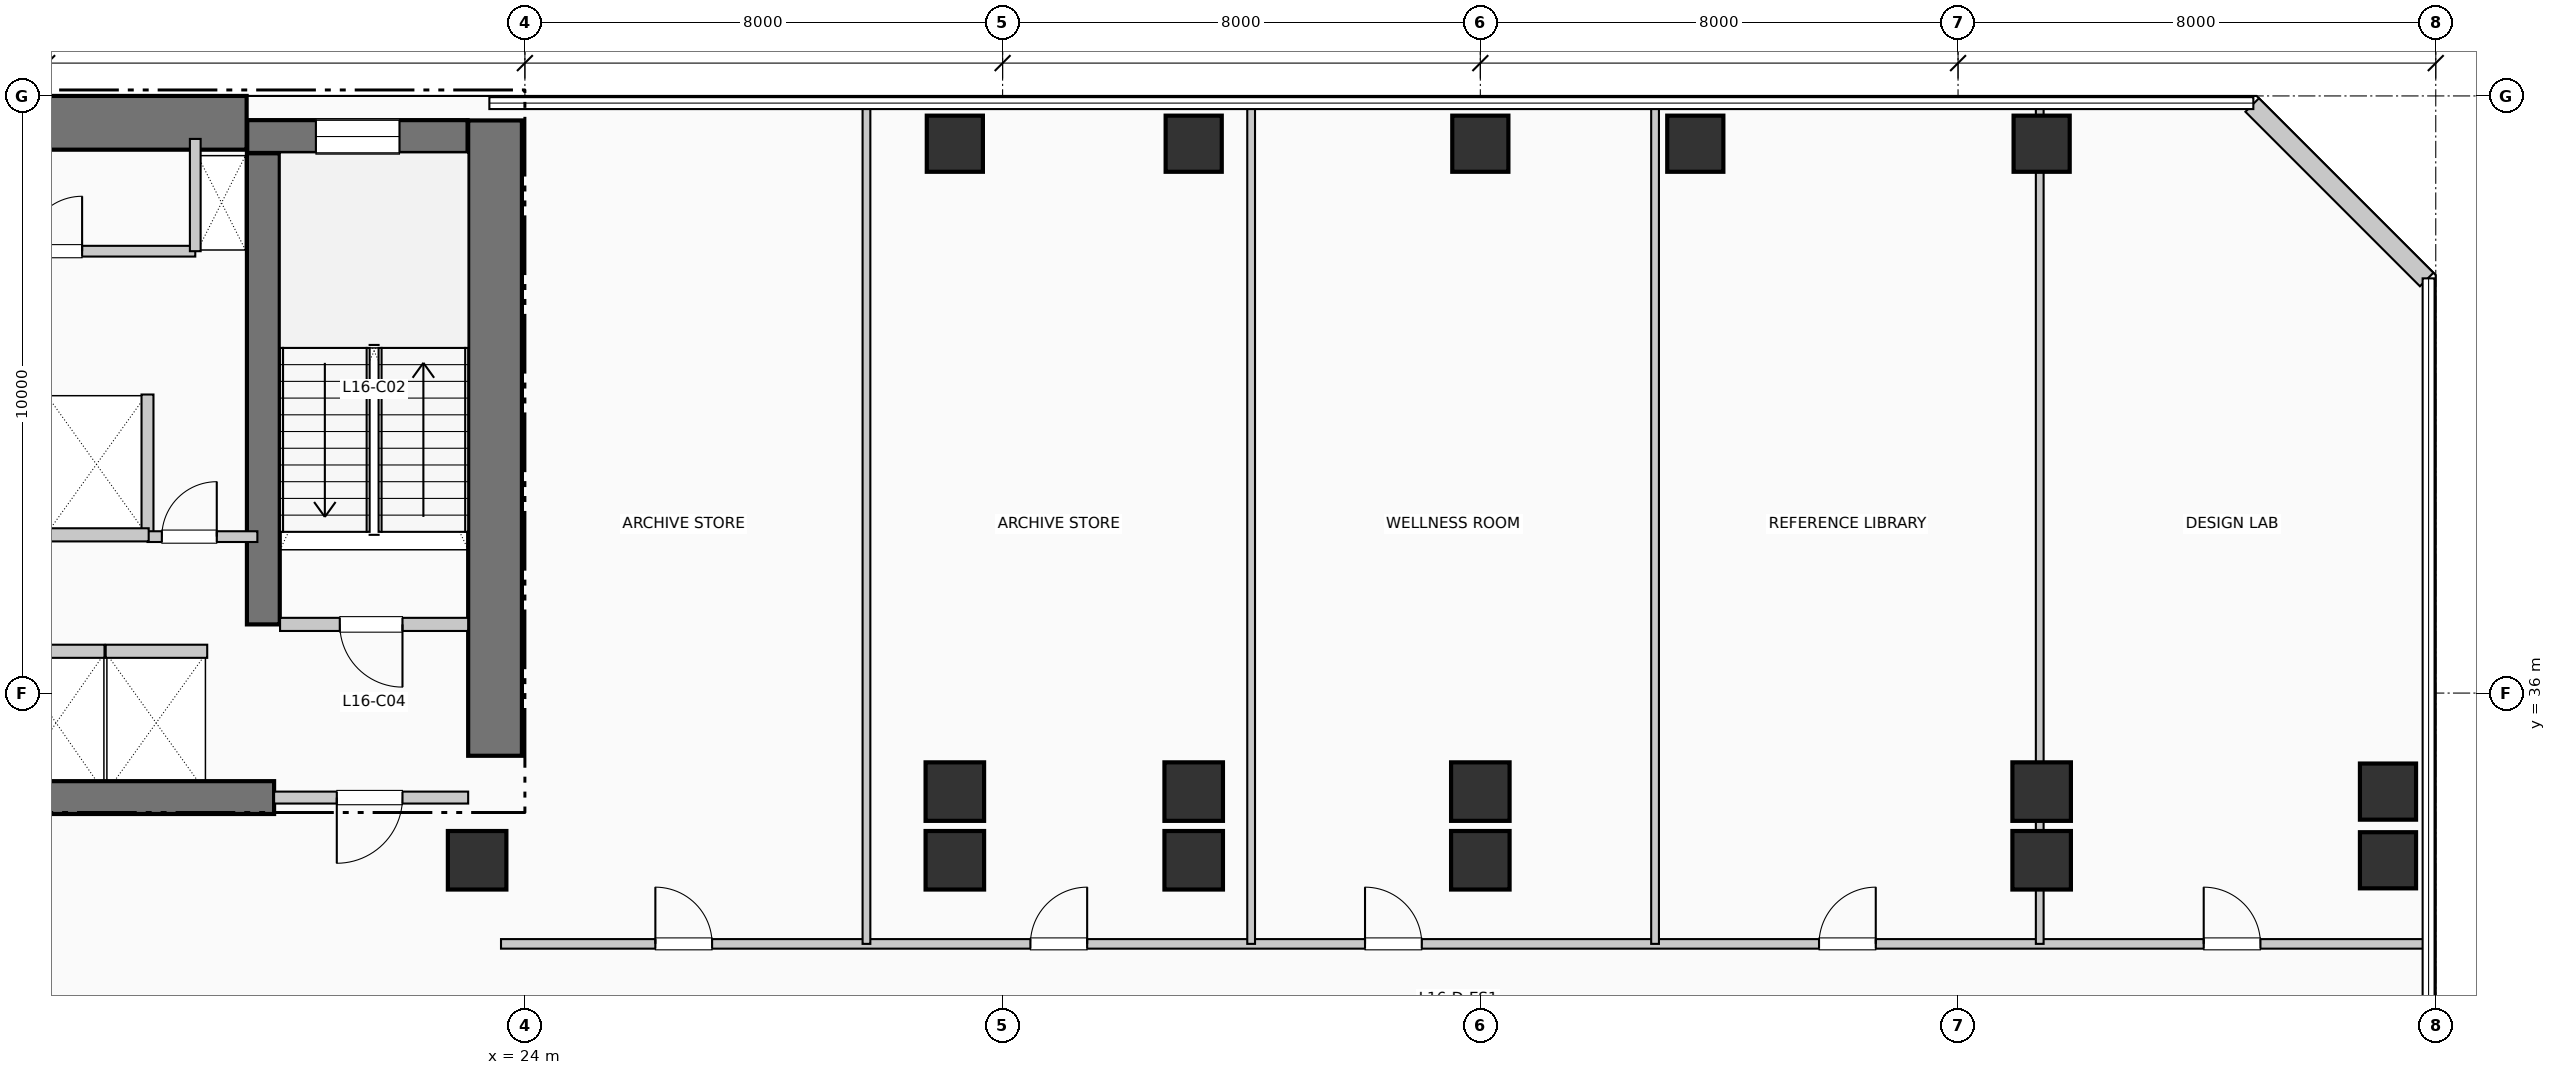
"""IFC4 building model, lengths in metres.
Left out: names, types, materials, properties, quantities, classifications, styles, units other than length and angle.
Written with IfcOpenShell. Run it as: python <this file> out.ifc"""

import sys

from ifc_helpers import new_model, si_unit, direction, frame, frame_2d, origin, origin_2d, place, context, subcontext, project, spatial, rectangle, extrude, element, fill, save


model = new_model("IFC4")
c1 = context("Model", 3, precision=1e-05, world=origin(), true_north=direction((0.0, 1.0)))
c2 = subcontext(c1, "Body", "Model", "MODEL_VIEW")
j1 = project(units=[si_unit("LENGTHUNIT", "METRE"), si_unit("PLANEANGLEUNIT", "RADIAN")], contexts=[c1])
p1 = place(None, origin())
s1 = spatial("IfcSite", under=j1, at=p1, CompositionType="ELEMENT")
p2 = place(p1, origin())
s2 = spatial("IfcBuilding", under=s1, at=p2, CompositionType="ELEMENT")
p3 = place(p2, frame((0.0, 0.0, 69.96)))
s3 = spatial("IfcBuildingStorey", under=s2, at=p3, CompositionType="ELEMENT", Elevation=69.96)
p4 = place(p3, frame((5.36, 45.55, 0.0), z_axis=(0.0, 0.0, 1.0), x_axis=(1.0, 0.0, 0.0)))
e1 = element("IfcWall", 1, at=p4, inside=s3, PredefinedType="SHEAR", context=c2, shape_type="SweptSolid", body=[
    extrude(rectangle(XDim=13.98, YDim=0.9, at=frame_2d((6.99, 0.0))), origin(), (0.0, 0.0, 1.0), 3.96),
])
p5 = place(p3, frame((23.5, 34.95, 0.0), z_axis=(0.0, 0.0, 1.0), x_axis=(0.0, 1.0, 0.0)))
e2 = element("IfcWall", 2, at=p5, inside=s3, PredefinedType="SHEAR", context=c2, shape_type="SweptSolid", body=[
    extrude(rectangle(XDim=10.64, YDim=0.9, at=frame_2d((5.32, 0.0))), origin(), (0.0, 0.0, 1.0), 3.96),
])
p6 = place(p3, frame((13.68, 34.25, 0.0), z_axis=(0.0, 0.0, 1.0), x_axis=(1.0, 0.0, 0.0)))
e3 = element("IfcWall", 3, at=p6, inside=s3, PredefinedType="SHEAR", context=c2, shape_type="SweptSolid", body=[
    extrude(rectangle(XDim=6.12, YDim=0.55, at=frame_2d((3.06, 0.0))), origin(), (0.0, 0.0, 1.0), 3.96),
])
p7 = place(p3, frame((19.62, 37.15, 0.0), z_axis=(0.0, 0.0, 1.0), x_axis=(0.0, 1.0, 0.0)))
e4 = element("IfcWall", 4, at=p7, inside=s3, PredefinedType="SHEAR", context=c2, shape_type="SweptSolid", body=[
    extrude(rectangle(XDim=7.89, YDim=0.55, at=frame_2d((3.945, 0.0))), origin(), (0.0, 0.0, 1.0), 3.96),
])
p8 = place(p3, frame((19.35, 45.32, 0.0), z_axis=(0.0, 0.0, 1.0), x_axis=(1.0, 0.0, 0.0)))
e5 = element("IfcWall", 5, at=p8, inside=s3, PredefinedType="SHEAR", context=c2, shape_type="SweptSolid", body=[
    extrude(rectangle(XDim=3.69, YDim=0.55, at=frame_2d((1.845, 0.0))), origin(), (0.0, 0.0, 1.0), 3.96),
])
p9 = place(p8, frame((1.15, 0.0, 1.05)))
e6 = element("IfcOpeningElement", 6, at=p9, cuts=e5, PredefinedType="OPENING", context=c2, shape_type="SweptSolid", body=[
    extrude(rectangle(XDim=1.4, YDim=1.8, at=frame_2d((0.7, 0.9))), frame((0.0, 0.285, 0.0), z_axis=(0.0, -1.0, 0.0), x_axis=(1.0, 0.0, 0.0)), (0.0, 0.0, 1.0), 0.57),
])
for number, where, z_axis, x_axis in (
    (7, (23.2, 33.2, 0.0), (0.0, 0.0, 1.0), (1.0, 0.0, 0.0)),
    (8, (31.2, 33.2, 0.0), (0.0, 0.0, 1.0), (1.0, 0.0, 0.0)),
    (9, (31.2, 34.35, 0.0), (0.0, 0.0, 1.0), (1.0, 0.0, 0.0)),
):
    element("IfcColumn", number, at=place(p3, frame(where, z_axis=z_axis, x_axis=x_axis)), inside=s3, PredefinedType="COLUMN", context=c2, shape_type="SweptSolid", body=[
        extrude(rectangle(XDim=0.98, YDim=0.98, at=origin_2d()), origin(), (0.0, 0.0, 1.0), 3.96),
    ])
p10 = place(p3, frame((31.2, 45.2, 0.0), z_axis=(0.0, 0.0, 1.0), x_axis=(1.0, 0.0, 0.0)))
e10 = element("IfcColumn", 10, at=p10, inside=s3, PredefinedType="COLUMN", context=c2, shape_type="SweptSolid", body=[
    extrude(rectangle(XDim=0.94, YDim=0.94, at=origin_2d()), origin(), (0.0, 0.0, 1.0), 3.96),
])
for number, where, z_axis, x_axis in (
    (11, (35.2, 33.2, 0.0), (0.0, 0.0, 1.0), (1.0, 0.0, 0.0)),
    (12, (35.2, 34.35, 0.0), (0.0, 0.0, 1.0), (1.0, 0.0, 0.0)),
):
    element("IfcColumn", number, at=place(p3, frame(where, z_axis=z_axis, x_axis=x_axis)), inside=s3, PredefinedType="COLUMN", context=c2, shape_type="SweptSolid", body=[
        extrude(rectangle(XDim=0.98, YDim=0.98, at=origin_2d()), origin(), (0.0, 0.0, 1.0), 3.96),
    ])
p11 = place(p3, frame((35.2, 45.2, 0.0), z_axis=(0.0, 0.0, 1.0), x_axis=(1.0, 0.0, 0.0)))
e13 = element("IfcColumn", 13, at=p11, inside=s3, PredefinedType="COLUMN", context=c2, shape_type="SweptSolid", body=[
    extrude(rectangle(XDim=0.94, YDim=0.94, at=origin_2d()), origin(), (0.0, 0.0, 1.0), 3.96),
])
for number, where, z_axis, x_axis in (
    (14, (40.0, 33.2, 0.0), (0.0, 0.0, 1.0), (1.0, 0.0, 0.0)),
    (15, (40.0, 34.35, 0.0), (0.0, 0.0, 1.0), (1.0, 0.0, 0.0)),
):
    element("IfcColumn", number, at=place(p3, frame(where, z_axis=z_axis, x_axis=x_axis)), inside=s3, PredefinedType="COLUMN", context=c2, shape_type="SweptSolid", body=[
        extrude(rectangle(XDim=0.98, YDim=0.98, at=origin_2d()), origin(), (0.0, 0.0, 1.0), 3.96),
    ])
for number, where, z_axis, x_axis in (
    (16, (40.0, 45.2, 0.0), (0.0, 0.0, 1.0), (1.0, 0.0, 0.0)),
    (17, (43.6, 45.2, 0.0), (0.0, 0.0, 1.0), (1.0, 0.0, 0.0)),
):
    element("IfcColumn", number, at=place(p3, frame(where, z_axis=z_axis, x_axis=x_axis)), inside=s3, PredefinedType="COLUMN", context=c2, shape_type="SweptSolid", body=[
        extrude(rectangle(XDim=0.94, YDim=0.94, at=origin_2d()), origin(), (0.0, 0.0, 1.0), 3.96),
    ])
for number, where, z_axis, x_axis in (
    (18, (49.4, 33.2, 0.0), (0.0, 0.0, 1.0), (1.0, 0.0, 0.0)),
    (19, (49.4, 34.35, 0.0), (0.0, 0.0, 1.0), (1.0, 0.0, 0.0)),
):
    element("IfcColumn", number, at=place(p3, frame(where, z_axis=z_axis, x_axis=x_axis)), inside=s3, PredefinedType="COLUMN", context=c2, shape_type="SweptSolid", body=[
        extrude(rectangle(XDim=0.98, YDim=0.98, at=origin_2d()), origin(), (0.0, 0.0, 1.0), 3.96),
    ])
for number, where, z_axis, x_axis in (
    (20, (49.4, 45.2, 0.0), (0.0, 0.0, 1.0), (1.0, 0.0, 0.0)),
    (21, (55.2, 33.2, 0.0), (0.0, 0.0, 1.0), (1.0, 0.0, 0.0)),
    (22, (55.2, 34.35, 0.0), (0.0, 0.0, 1.0), (1.0, 0.0, 0.0)),
):
    element("IfcColumn", number, at=place(p3, frame(where, z_axis=z_axis, x_axis=x_axis)), inside=s3, PredefinedType="COLUMN", context=c2, shape_type="SweptSolid", body=[
        extrude(rectangle(XDim=0.94, YDim=0.94, at=origin_2d()), origin(), (0.0, 0.0, 1.0), 3.96),
    ])
p12 = place(p3, frame((55.848, 42.926, 0.0), z_axis=(0.0, 0.0, 1.0), x_axis=(-0.707106781187, 0.707106781187, 0.0)))
e23 = element("IfcWall", 23, at=p12, inside=s3, PredefinedType="SOLIDWALL", context=c2, shape_type="SweptSolid", body=[
    extrude(rectangle(XDim=4.133, YDim=0.32, at=frame_2d((2.066, 0.0))), origin(), (0.0, 0.0, 1.0), 3.71),
])
p13 = place(p3, frame((19.9, 37.15, 0.0), z_axis=(0.0, 0.0, 1.0), x_axis=(1.0, 0.0, 0.0)))
e24 = element("IfcWall", 24, at=p13, inside=s3, PredefinedType="PARTITIONING", context=c2, shape_type="SweptSolid", body=[
    extrude(rectangle(XDim=3.15, YDim=0.22, at=frame_2d((1.575, 0.0))), origin(), (0.0, 0.0, 1.0), 3.71),
])
p14 = place(p13, frame((2.05, 0.0, 0.0), z_axis=(0.0, 0.0, 1.0), x_axis=(-1.0, 0.0, 0.0)))
e25 = element("IfcOpeningElement", 25, at=p14, cuts=e24, PredefinedType="OPENING", context=c2, shape_type="SweptSolid", body=[
    extrude(rectangle(XDim=1.05, YDim=2.15, at=frame_2d((0.525, 1.075))), frame((0.0, 0.12, 0.0), z_axis=(0.0, -1.0, 0.0), x_axis=(1.0, 0.0, 0.0)), (0.0, 0.0, 1.0), 0.24),
])
p15 = place(p3, frame((19.8, 34.25, 0.0), z_axis=(0.0, 0.0, 1.0), x_axis=(1.0, 0.0, 0.0)))
e26 = element("IfcWall", 26, at=p15, inside=s3, PredefinedType="PARTITIONING", context=c2, shape_type="SweptSolid", body=[
    extrude(rectangle(XDim=3.25, YDim=0.2, at=frame_2d((1.625, 0.0))), origin(), (0.0, 0.0, 1.0), 3.71),
])
p16 = place(p15, frame((2.15, 0.0, 0.0), z_axis=(0.0, 0.0, 1.0), x_axis=(-1.0, 0.0, 0.0)))
e27 = element("IfcOpeningElement", 27, at=p16, cuts=e26, PredefinedType="OPENING", context=c2, shape_type="SweptSolid", body=[
    extrude(rectangle(XDim=1.1, YDim=2.15, at=frame_2d((0.55, 1.075))), frame((0.0, 0.11, 0.0), z_axis=(0.0, -1.0, 0.0), x_axis=(1.0, 0.0, 0.0)), (0.0, 0.0, 1.0), 0.22),
])
p17 = place(p3, frame((17.68, 38.65, 0.0), z_axis=(0.0, 0.0, 1.0), x_axis=(0.0, 1.0, 0.0)))
e28 = element("IfcWall", 28, at=p17, inside=s3, PredefinedType="PARTITIONING", context=c2, shape_type="SweptSolid", body=[
    extrude(rectangle(XDim=2.35, YDim=0.2, at=frame_2d((1.175, 0.0))), origin(), (0.0, 0.0, 1.0), 3.71),
])
p18 = place(p3, frame((17.68, 38.62, 0.0), z_axis=(0.0, 0.0, 1.0), x_axis=(1.0, 0.0, 0.0)))
e29 = element("IfcWall", 29, at=p18, inside=s3, PredefinedType="PARTITIONING", context=c2, shape_type="SweptSolid", body=[
    extrude(rectangle(XDim=1.84, YDim=0.18, at=frame_2d((0.92, 0.0))), origin(), (0.0, 0.0, 1.0), 3.71),
])
p19 = place(p18, frame((0.24, 0.0, 0.0)))
e30 = element("IfcOpeningElement", 30, at=p19, cuts=e29, PredefinedType="OPENING", context=c2, shape_type="SweptSolid", body=[
    extrude(rectangle(XDim=0.92, YDim=2.1, at=frame_2d((0.46, 1.05))), frame((0.0, 0.1, 0.0), z_axis=(0.0, -1.0, 0.0), x_axis=(1.0, 0.0, 0.0)), (0.0, 0.0, 1.0), 0.2),
])
p20 = place(p3, frame((13.68, 36.7, 0.0), z_axis=(0.0, 0.0, 1.0), x_axis=(1.0, 0.0, 0.0)))
e31 = element("IfcWall", 31, at=p20, inside=s3, PredefinedType="PARTITIONING", context=c2, shape_type="SweptSolid", body=[
    extrude(rectangle(XDim=3.28, YDim=0.22, at=frame_2d((1.64, 0.0))), origin(), (0.0, 0.0, 1.0), 3.71),
])
p21 = place(p3, frame((16.98, 36.7, 0.0), z_axis=(0.0, 0.0, 1.0), x_axis=(1.0, 0.0, 0.0)))
e32 = element("IfcWall", 32, at=p21, inside=s3, PredefinedType="PARTITIONING", context=c2, shape_type="SweptSolid", body=[
    extrude(rectangle(XDim=1.7, YDim=0.22, at=frame_2d((0.85, 0.0))), origin(), (0.0, 0.0, 1.0), 3.71),
])
p22 = place(p3, frame((15.98, 38.65, 0.0), z_axis=(0.0, 0.0, 1.0), x_axis=(1.0, 0.0, 0.0)))
e33 = element("IfcWall", 33, at=p22, inside=s3, PredefinedType="PARTITIONING", context=c2, shape_type="SweptSolid", body=[
    extrude(rectangle(XDim=1.72, YDim=0.22, at=frame_2d((0.86, 0.0))), origin(), (0.0, 0.0, 1.0), 3.71),
])
p23 = place(p3, frame((9.15, 43.4, 0.0), z_axis=(0.0, 0.0, 1.0), x_axis=(1.0, 0.0, 0.0)))
e34 = element("IfcWall", 34, at=p23, inside=s3, PredefinedType="PLUMBINGWALL", context=c2, shape_type="SweptSolid", body=[
    extrude(rectangle(XDim=9.33, YDim=0.18, at=frame_2d((4.665, 0.0))), origin(), (0.0, 0.0, 1.0), 3.71),
])
p24 = place(p23, frame((1.88, 0.0, 0.0)))
e35 = element("IfcOpeningElement", 35, at=p24, cuts=e34, PredefinedType="OPENING", context=c2, shape_type="SweptSolid", body=[
    extrude(rectangle(XDim=0.92, YDim=2.1, at=frame_2d((0.46, 1.05))), frame((0.0, 0.1, 0.0), z_axis=(0.0, -1.0, 0.0), x_axis=(1.0, 0.0, 0.0)), (0.0, 0.0, 1.0), 0.2),
])
p25 = place(p23, frame((6.515, 0.0, 0.0)))
e36 = element("IfcOpeningElement", 36, at=p25, cuts=e34, PredefinedType="OPENING", context=c2, shape_type="SweptSolid", body=[
    extrude(rectangle(XDim=0.92, YDim=2.1, at=frame_2d((0.46, 1.05))), frame((0.0, 0.1, 0.0), z_axis=(0.0, -1.0, 0.0), x_axis=(1.0, 0.0, 0.0)), (0.0, 0.0, 1.0), 0.2),
])
p26 = place(p3, frame((18.48, 43.4, 0.0), z_axis=(0.0, 0.0, 1.0), x_axis=(0.0, 1.0, 0.0)))
e37 = element("IfcWall", 37, at=p26, inside=s3, PredefinedType="PLUMBINGWALL", context=c2, shape_type="SweptSolid", body=[
    extrude(rectangle(XDim=1.88, YDim=0.18, at=frame_2d((0.94, 0.0))), origin(), (0.0, 0.0, 1.0), 3.71),
])
p27 = place(p3, frame((23.6, 31.8, 0.0), z_axis=(0.0, 0.0, 1.0), x_axis=(1.0, 0.0, 0.0)))
e38 = element("IfcWall", 38, at=p27, inside=s3, PredefinedType="PARTITIONING", context=c2, shape_type="SweptSolid", body=[
    extrude(rectangle(XDim=32.21, YDim=0.16, at=frame_2d((16.105, 0.0))), origin(), (0.0, 0.0, 1.0), 3.71),
])
p28 = place(p27, frame((2.585, 0.0, 0.0)))
e39 = element("IfcOpeningElement", 39, at=p28, cuts=e38, PredefinedType="OPENING", context=c2, shape_type="SweptSolid", body=[
    extrude(rectangle(XDim=0.95, YDim=2.15, at=frame_2d((0.475, 1.075))), frame((0.0, 0.09, 0.0), z_axis=(0.0, -1.0, 0.0), x_axis=(1.0, 0.0, 0.0)), (0.0, 0.0, 1.0), 0.18),
])
p29 = place(p27, frame((8.866, 0.0, 0.0)))
e40 = element("IfcOpeningElement", 40, at=p29, cuts=e38, PredefinedType="OPENING", context=c2, shape_type="SweptSolid", body=[
    extrude(rectangle(XDim=0.95, YDim=2.15, at=frame_2d((0.475, 1.075))), frame((0.0, 0.09, 0.0), z_axis=(0.0, -1.0, 0.0), x_axis=(1.0, 0.0, 0.0)), (0.0, 0.0, 1.0), 0.18),
])
p30 = place(p27, frame((14.469, 0.0, 0.0)))
e41 = element("IfcOpeningElement", 41, at=p30, cuts=e38, PredefinedType="OPENING", context=c2, shape_type="SweptSolid", body=[
    extrude(rectangle(XDim=0.95, YDim=2.15, at=frame_2d((0.475, 1.075))), frame((0.0, 0.09, 0.0), z_axis=(0.0, -1.0, 0.0), x_axis=(1.0, 0.0, 0.0)), (0.0, 0.0, 1.0), 0.18),
])
p31 = place(p27, frame((22.072, 0.0, 0.0)))
e42 = element("IfcOpeningElement", 42, at=p31, cuts=e38, PredefinedType="OPENING", context=c2, shape_type="SweptSolid", body=[
    extrude(rectangle(XDim=0.95, YDim=2.15, at=frame_2d((0.475, 1.075))), frame((0.0, 0.09, 0.0), z_axis=(0.0, -1.0, 0.0), x_axis=(1.0, 0.0, 0.0)), (0.0, 0.0, 1.0), 0.18),
])
p32 = place(p27, frame((28.514, 0.0, 0.0)))
e43 = element("IfcOpeningElement", 43, at=p32, cuts=e38, PredefinedType="OPENING", context=c2, shape_type="SweptSolid", body=[
    extrude(rectangle(XDim=0.95, YDim=2.15, at=frame_2d((0.475, 1.075))), frame((0.0, 0.09, 0.0), z_axis=(0.0, -1.0, 0.0), x_axis=(1.0, 0.0, 0.0)), (0.0, 0.0, 1.0), 0.18),
])
for number, where, z_axis, x_axis in (
    (44, (29.72, 31.8, 0.0), (0.0, 0.0, 1.0), (0.0, 1.0, 0.0)),
    (45, (36.162, 31.8, 0.0), (0.0, 0.0, 1.0), (0.0, 1.0, 0.0)),
    (46, (42.926, 31.8, 0.0), (0.0, 0.0, 1.0), (0.0, 1.0, 0.0)),
):
    element("IfcWall", number, at=place(p3, frame(where, z_axis=z_axis, x_axis=x_axis)), inside=s3, PredefinedType="PARTITIONING", context=c2, shape_type="SweptSolid", body=[
        extrude(rectangle(XDim=14.01, YDim=0.13, at=frame_2d((7.005, 0.0))), origin(), (0.0, 0.0, 1.0), 3.71),
    ])
p33 = place(p3, frame((49.368, 31.8, 0.0), z_axis=(0.0, 0.0, 1.0), x_axis=(0.0, 1.0, 0.0)))
e47 = element("IfcWall", 47, at=p33, inside=s3, PredefinedType="PARTITIONING", context=c2, shape_type="SweptSolid", body=[
    extrude(rectangle(XDim=14.01, YDim=0.13, at=frame_2d((7.005, 0.0))), origin(), (0.0, 0.0, 1.0), 2.995),
])
p34 = place(p9, origin())
e48 = element("IfcWindow", 48, at=p34, inside=s3, PartitioningType="SINGLE_PANEL", PredefinedType="WINDOW", context=c2, shape_type="SweptSolid", body=[
    extrude(rectangle(XDim=1.4, YDim=1.8, at=frame_2d((0.7, 0.9))), frame((0.0, 0.03, 0.0), z_axis=(0.0, -1.0, 0.0), x_axis=(1.0, 0.0, 0.0)), (0.0, 0.0, 1.0), 0.06),
])
fill(e6, e48)
p35 = place(p14, origin())
e49 = element("IfcDoor", 49, at=p35, inside=s3, OperationType="SINGLE_SWING_RIGHT", PredefinedType="DOOR", context=c2, shape_type="SweptSolid", body=[
    extrude(rectangle(XDim=1.05, YDim=2.15, at=frame_2d((0.525, 1.075))), frame((0.0, 0.025, 0.0), z_axis=(0.0, -1.0, 0.0), x_axis=(1.0, 0.0, 0.0)), (0.0, 0.0, 1.0), 0.05),
])
fill(e25, e49)
p36 = place(p16, origin())
e50 = element("IfcDoor", 50, at=p36, inside=s3, OperationType="SINGLE_SWING_LEFT", PredefinedType="DOOR", context=c2, shape_type="SweptSolid", body=[
    extrude(rectangle(XDim=1.1, YDim=2.15, at=frame_2d((0.55, 1.075))), frame((0.0, 0.025, 0.0), z_axis=(0.0, -1.0, 0.0), x_axis=(1.0, 0.0, 0.0)), (0.0, 0.0, 1.0), 0.05),
])
fill(e27, e50)
p37 = place(p19, origin())
e51 = element("IfcDoor", 51, at=p37, inside=s3, OperationType="SINGLE_SWING_RIGHT", PredefinedType="DOOR", context=c2, shape_type="SweptSolid", body=[
    extrude(rectangle(XDim=0.92, YDim=2.1, at=frame_2d((0.46, 1.05))), frame((0.0, 0.025, 0.0), z_axis=(0.0, -1.0, 0.0), x_axis=(1.0, 0.0, 0.0)), (0.0, 0.0, 1.0), 0.05),
])
fill(e30, e51)
p38 = place(p25, origin())
e52 = element("IfcDoor", 52, at=p38, inside=s3, OperationType="SINGLE_SWING_RIGHT", PredefinedType="DOOR", context=c2, shape_type="SweptSolid", body=[
    extrude(rectangle(XDim=0.92, YDim=2.1, at=frame_2d((0.46, 1.05))), frame((0.0, 0.025, 0.0), z_axis=(0.0, -1.0, 0.0), x_axis=(1.0, 0.0, 0.0)), (0.0, 0.0, 1.0), 0.05),
])
fill(e36, e52)
p39 = place(p28, origin())
e53 = element("IfcDoor", 53, at=p39, inside=s3, OperationType="SINGLE_SWING_LEFT", PredefinedType="DOOR", context=c2, shape_type="SweptSolid", body=[
    extrude(rectangle(XDim=0.95, YDim=2.15, at=frame_2d((0.475, 1.075))), frame((0.0, 0.025, 0.0), z_axis=(0.0, -1.0, 0.0), x_axis=(1.0, 0.0, 0.0)), (0.0, 0.0, 1.0), 0.05),
])
fill(e39, e53)
p40 = place(p29, origin())
e54 = element("IfcDoor", 54, at=p40, inside=s3, OperationType="SINGLE_SWING_RIGHT", PredefinedType="DOOR", context=c2, shape_type="SweptSolid", body=[
    extrude(rectangle(XDim=0.95, YDim=2.15, at=frame_2d((0.475, 1.075))), frame((0.0, 0.025, 0.0), z_axis=(0.0, -1.0, 0.0), x_axis=(1.0, 0.0, 0.0)), (0.0, 0.0, 1.0), 0.05),
])
fill(e40, e54)
p41 = place(p30, origin())
e55 = element("IfcDoor", 55, at=p41, inside=s3, OperationType="SINGLE_SWING_LEFT", PredefinedType="DOOR", context=c2, shape_type="SweptSolid", body=[
    extrude(rectangle(XDim=0.95, YDim=2.15, at=frame_2d((0.475, 1.075))), frame((0.0, 0.025, 0.0), z_axis=(0.0, -1.0, 0.0), x_axis=(1.0, 0.0, 0.0)), (0.0, 0.0, 1.0), 0.05),
])
fill(e41, e55)
p42 = place(p31, origin())
e56 = element("IfcDoor", 56, at=p42, inside=s3, OperationType="SINGLE_SWING_RIGHT", PredefinedType="DOOR", context=c2, shape_type="SweptSolid", body=[
    extrude(rectangle(XDim=0.95, YDim=2.15, at=frame_2d((0.475, 1.075))), frame((0.0, 0.025, 0.0), z_axis=(0.0, -1.0, 0.0), x_axis=(1.0, 0.0, 0.0)), (0.0, 0.0, 1.0), 0.05),
])
fill(e42, e56)
p43 = place(p32, origin())
e57 = element("IfcDoor", 57, at=p43, inside=s3, OperationType="SINGLE_SWING_LEFT", PredefinedType="DOOR", context=c2, shape_type="SweptSolid", body=[
    extrude(rectangle(XDim=0.95, YDim=2.15, at=frame_2d((0.475, 1.075))), frame((0.0, 0.025, 0.0), z_axis=(0.0, -1.0, 0.0), x_axis=(1.0, 0.0, 0.0)), (0.0, 0.0, 1.0), 0.05),
])
fill(e43, e57)
save(model, sys.argv[1])
